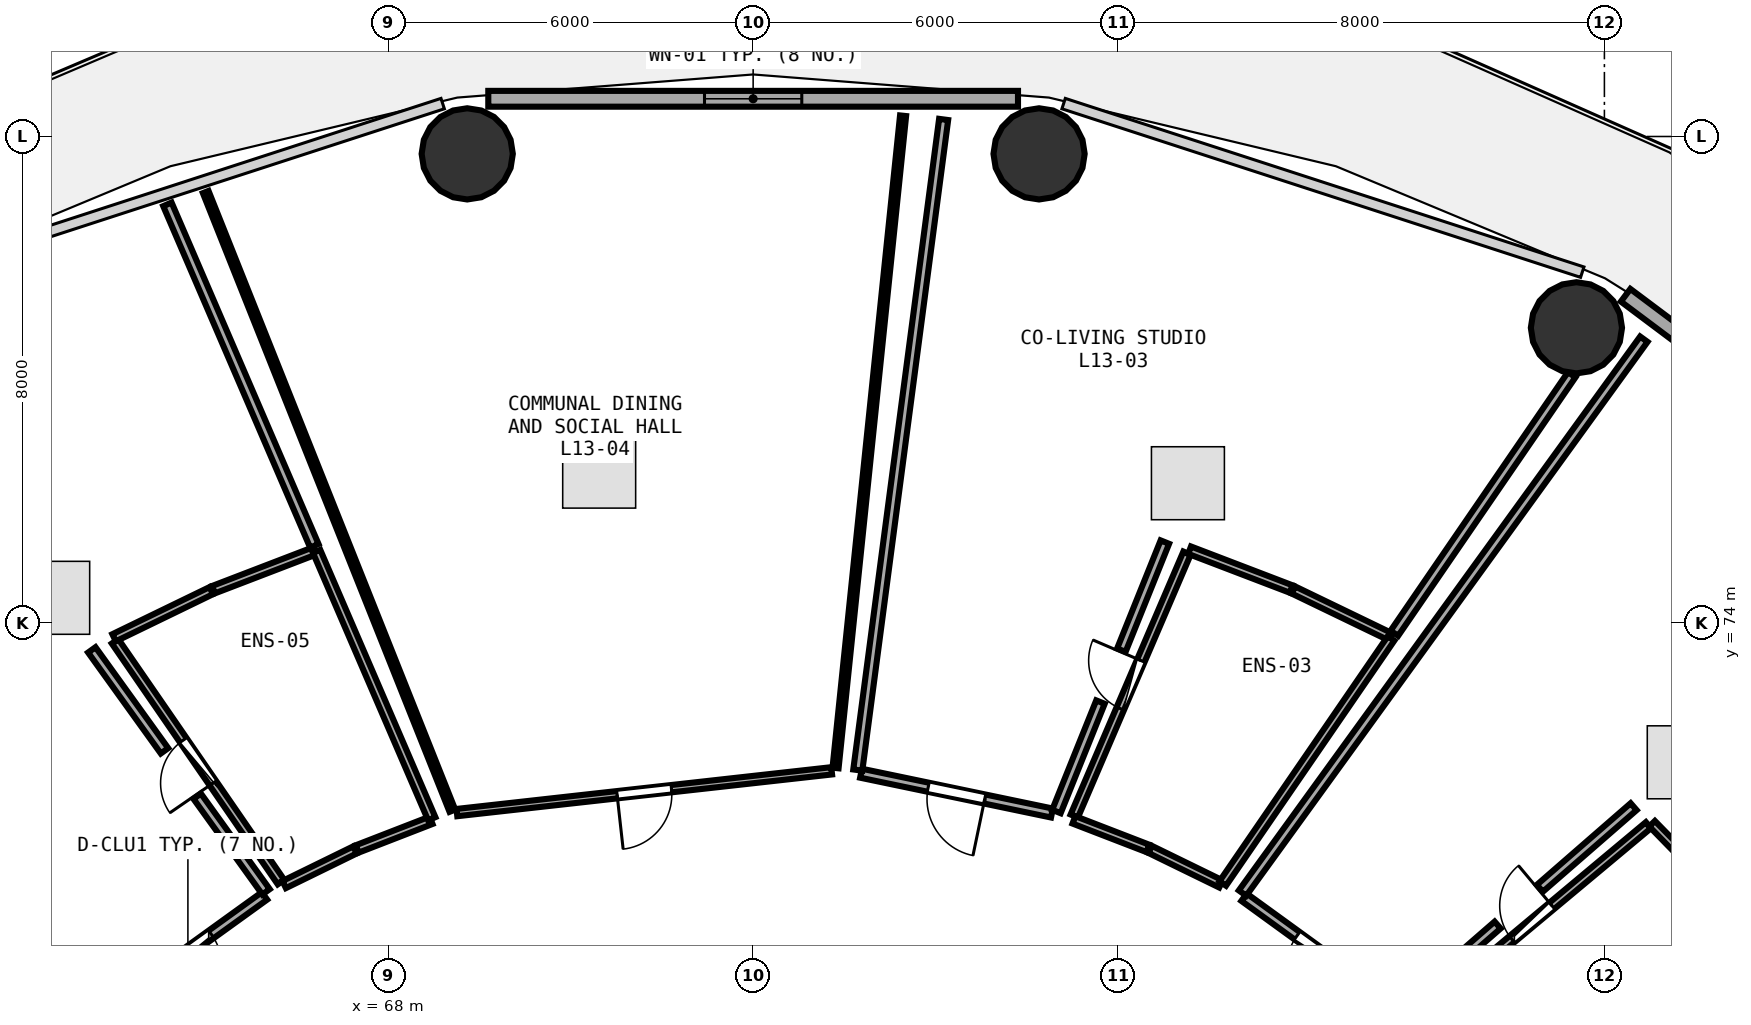
"""IFC4 building model, lengths in metres.
Left out: names, types, materials, properties, quantities, classifications, styles, units other than length and angle.
Written with IfcOpenShell. Run it as: python <this file> out.ifc"""

import sys

from ifc_helpers import new_model, si_unit, direction, frame, frame_2d, origin, origin_2d, place, context, subcontext, project, spatial, rectangle, circle, extrude, element, fill, save


model = new_model("IFC4")
c1 = context("Model", 3, precision=1e-05, world=origin(), true_north=direction((0.0, 1.0)))
c2 = subcontext(c1, "Body", "Model", "MODEL_VIEW")
j1 = project(units=[si_unit("LENGTHUNIT", "METRE"), si_unit("PLANEANGLEUNIT", "RADIAN")], contexts=[c1])
p1 = place(None, origin())
s1 = spatial("IfcSite", under=j1, at=p1, CompositionType="ELEMENT")
p2 = place(p1, origin())
s2 = spatial("IfcBuilding", under=s1, at=p2, CompositionType="ELEMENT")
p3 = place(p2, frame((0.0, 0.0, 52.5)))
s3 = spatial("IfcBuildingStorey", under=s2, at=p3, CompositionType="ELEMENT", Elevation=52.5)
for number, where, z_axis, x_axis in (
    (1, (87.54, 78.854, 0.0), (0.0, 0.0, 1.0), (1.0, 0.0, 0.0)),
    (2, (78.702, 81.714, 0.0), (0.0, 0.0, 1.0), (1.0, 0.0, 0.0)),
    (3, (69.298, 81.714, 0.0), (0.0, 0.0, 1.0), (1.0, 0.0, 0.0)),
):
    element("IfcColumn", number, at=place(p3, frame(where, z_axis=z_axis, x_axis=x_axis)), inside=s3, PredefinedType="COLUMN", context=c2, shape_type="SweptSolid", body=[
        extrude(circle(Radius=0.75, at=origin_2d()), origin(), (0.0, 0.0, 1.0), 3.75),
    ])
p4 = place(p3, frame((94.984, 74.418, 0.0), z_axis=(0.0, 0.0, 1.0), x_axis=(-0.80030733173, 0.599590005569, 0.0)))
e4 = element("IfcWall", 4, at=p4, inside=s3, PredefinedType="SOLIDWALL", context=c2, shape_type="SweptSolid", body=[
    extrude(rectangle(XDim=8.291, YDim=0.26, at=frame_2d((4.145, 0.0))), origin(), (0.0, 0.0, 1.0), 3.475),
])
p5 = place(p4, frame((3.67, 0.0, 0.0)))
e5 = element("IfcOpeningElement", 5, at=p5, cuts=e4, PredefinedType="OPENING", context=c2, shape_type="SweptSolid", body=[
    extrude(rectangle(XDim=0.95, YDim=2.1, at=frame_2d((0.475, 1.05))), frame((0.0, 0.14, 0.0), z_axis=(0.0, -1.0, 0.0), x_axis=(1.0, 0.0, 0.0)), (0.0, 0.0, 1.0), 0.28),
])
p6 = place(p4, frame((4.97, 0.0, 0.85)))
e6 = element("IfcOpeningElement", 6, at=p6, cuts=e4, PredefinedType="OPENING", context=c2, shape_type="SweptSolid", body=[
    extrude(rectangle(XDim=1.2, YDim=1.45, at=frame_2d((0.6, 0.725))), frame((0.0, 0.14, 0.0), z_axis=(0.0, -1.0, 0.0), x_axis=(1.0, 0.0, 0.0)), (0.0, 0.0, 1.0), 0.28),
])
p7 = place(p3, frame((78.356, 82.62, 0.0), z_axis=(0.0, 0.0, 1.0), x_axis=(-1.0, 0.0, 0.0)))
e7 = element("IfcWall", 7, at=p7, inside=s3, PredefinedType="SOLIDWALL", context=c2, shape_type="SweptSolid", body=[
    extrude(rectangle(XDim=8.712, YDim=0.26, at=frame_2d((4.356, 0.0))), origin(), (0.0, 0.0, 1.0), 3.475),
])
p8 = place(p7, frame((3.556, 0.0, 0.85)))
e8 = element("IfcOpeningElement", 8, at=p8, cuts=e7, PredefinedType="OPENING", context=c2, shape_type="SweptSolid", body=[
    extrude(rectangle(XDim=1.6, YDim=1.45, at=frame_2d((0.8, 0.725))), frame((0.0, 0.14, 0.0), z_axis=(0.0, -1.0, 0.0), x_axis=(1.0, 0.0, 0.0)), (0.0, 0.0, 1.0), 0.28),
])
p9 = place(p3, frame((84.892, 67.475, 0.0), z_axis=(0.0, 0.0, 1.0), x_axis=(0.767551433238, 0.64098736129, 0.0)))
e9 = element("IfcWall", 9, at=p9, inside=s3, PredefinedType="PLUMBINGWALL", context=c2, shape_type="SweptSolid", body=[
    extrude(rectangle(XDim=4.992, YDim=0.13, at=frame_2d((2.496, 0.0))), origin(), (0.0, 0.0, 1.0), 3.175),
])
p10 = place(p9, frame((2.066, 0.0, 0.0)))
e10 = element("IfcOpeningElement", 10, at=p10, cuts=e9, PredefinedType="OPENING", context=c2, shape_type="SweptSolid", body=[
    extrude(rectangle(XDim=0.86, YDim=2.05, at=frame_2d((0.43, 1.025))), frame((0.0, 0.075, 0.0), z_axis=(0.0, -1.0, 0.0), x_axis=(1.0, 0.0, 0.0)), (0.0, 0.0, 1.0), 0.15),
])
p11 = place(p3, frame((84.586, 67.667, 0.0), z_axis=(0.0, 0.0, 1.0), x_axis=(-0.80951419377, 0.587100306664, 0.0)))
e11 = element("IfcWall", 11, at=p11, inside=s3, PredefinedType="PARTITIONING", context=c2, shape_type="SweptSolid", body=[
    extrude(rectangle(XDim=3.104, YDim=0.15, at=frame_2d((1.552, 0.0))), origin(), (0.0, 0.0, 1.0), 2.875),
])
p12 = place(p11, frame((1.077, 0.0, 0.0)))
e12 = element("IfcOpeningElement", 12, at=p12, cuts=e11, PredefinedType="OPENING", context=c2, shape_type="SweptSolid", body=[
    extrude(rectangle(XDim=0.95, YDim=2.08, at=frame_2d((0.475, 1.04))), frame((0.0, 0.085, 0.0), z_axis=(0.0, -1.0, 0.0), x_axis=(1.0, 0.0, 0.0)), (0.0, 0.0, 1.0), 0.17),
])
p13 = place(p3, frame((79.281, 70.824, 0.0), z_axis=(0.0, 0.0, 1.0), x_axis=(0.394194788946, 0.919026913843, 0.0)))
e13 = element("IfcWall", 13, at=p13, inside=s3, PredefinedType="PLUMBINGWALL", context=c2, shape_type="SweptSolid", body=[
    extrude(rectangle(XDim=4.706, YDim=0.13, at=frame_2d((2.353, 0.0))), origin(), (0.0, 0.0, 1.0), 2.875),
])
p14 = place(p13, frame((1.923, 0.0, 0.0)))
e14 = element("IfcOpeningElement", 14, at=p14, cuts=e13, PredefinedType="OPENING", context=c2, shape_type="SweptSolid", body=[
    extrude(rectangle(XDim=0.86, YDim=2.05, at=frame_2d((0.43, 1.025))), frame((0.0, 0.075, 0.0), z_axis=(0.0, -1.0, 0.0), x_axis=(1.0, 0.0, 0.0)), (0.0, 0.0, 1.0), 0.15),
])
p15 = place(p3, frame((78.914, 70.874, 0.0), z_axis=(0.0, 0.0, 1.0), x_axis=(-0.978952544969, 0.204088007237, 0.0)))
e15 = element("IfcWall", 15, at=p15, inside=s3, PredefinedType="PARTITIONING", context=c2, shape_type="SweptSolid", body=[
    extrude(rectangle(XDim=3.207, YDim=0.15, at=frame_2d((1.604, 0.0))), origin(), (0.0, 0.0, 1.0), 3.235),
])
p16 = place(p15, frame((1.129, 0.0, 0.0)))
e16 = element("IfcOpeningElement", 16, at=p16, cuts=e15, PredefinedType="OPENING", context=c2, shape_type="SweptSolid", body=[
    extrude(rectangle(XDim=0.95, YDim=2.08, at=frame_2d((0.475, 1.04))), frame((0.0, 0.085, 0.0), z_axis=(0.0, -1.0, 0.0), x_axis=(1.0, 0.0, 0.0)), (0.0, 0.0, 1.0), 0.17),
])
p17 = place(p3, frame((75.292, 71.568, 0.0), z_axis=(0.0, 0.0, 1.0), x_axis=(-0.993850084324, -0.110733959964, 0.0)))
e17 = element("IfcWall", 17, at=p17, inside=s3, PredefinedType="PARTITIONING", context=c2, shape_type="SweptSolid", body=[
    extrude(rectangle(XDim=6.202, YDim=0.12, at=frame_2d((3.101, 0.0))), origin(), (0.0, 0.0, 1.0), 2.875),
])
p18 = place(p17, frame((2.651, 0.0, 0.0)))
e18 = element("IfcOpeningElement", 18, at=p18, cuts=e17, PredefinedType="OPENING", context=c2, shape_type="SweptSolid", body=[
    extrude(rectangle(XDim=0.9, YDim=2.08, at=frame_2d((0.45, 1.04))), frame((0.0, 0.07, 0.0), z_axis=(0.0, -1.0, 0.0), x_axis=(1.0, 0.0, 0.0)), (0.0, 0.0, 1.0), 0.14),
])
p19 = place(p3, frame((66.235, 69.738, 0.0), z_axis=(0.0, 0.0, 1.0), x_axis=(-0.567426867042, 0.823423797664, 0.0)))
e19 = element("IfcWall", 19, at=p19, inside=s3, PredefinedType="PLUMBINGWALL", context=c2, shape_type="SweptSolid", body=[
    extrude(rectangle(XDim=4.809, YDim=0.13, at=frame_2d((2.405, 0.0))), origin(), (0.0, 0.0, 1.0), 3.175),
])
p20 = place(p19, frame((1.975, 0.0, 0.0)))
e20 = element("IfcOpeningElement", 20, at=p20, cuts=e19, PredefinedType="OPENING", context=c2, shape_type="SweptSolid", body=[
    extrude(rectangle(XDim=0.86, YDim=2.05, at=frame_2d((0.43, 1.025))), frame((0.0, 0.075, 0.0), z_axis=(0.0, -1.0, 0.0), x_axis=(1.0, 0.0, 0.0)), (0.0, 0.0, 1.0), 0.15),
])
p21 = place(p3, frame((65.963, 69.511, 0.0), z_axis=(0.0, 0.0, 1.0), x_axis=(-0.811021116066, -0.585016879496, 0.0)))
e21 = element("IfcWall", 21, at=p21, inside=s3, PredefinedType="PARTITIONING", context=c2, shape_type="SweptSolid", body=[
    extrude(rectangle(XDim=3.106, YDim=0.15, at=frame_2d((1.553, 0.0))), origin(), (0.0, 0.0, 1.0), 2.875),
])
p22 = place(p21, frame((1.078, 0.0, 0.0)))
e22 = element("IfcOpeningElement", 22, at=p22, cuts=e21, PredefinedType="OPENING", context=c2, shape_type="SweptSolid", body=[
    extrude(rectangle(XDim=0.95, YDim=2.08, at=frame_2d((0.475, 1.04))), frame((0.0, 0.085, 0.0), z_axis=(0.0, -1.0, 0.0), x_axis=(1.0, 0.0, 0.0)), (0.0, 0.0, 1.0), 0.17),
])
p23 = place(p3, frame((86.779, 65.245, 0.0), z_axis=(0.0, 0.0, 1.0), x_axis=(0.878114235828, 0.478451030761, 0.0)))
e23 = element("IfcWall", 23, at=p23, inside=s3, PredefinedType="PARTITIONING", context=c2, shape_type="SweptSolid", body=[
    extrude(rectangle(XDim=11.942, YDim=0.15, at=frame_2d((5.971, 0.0))), origin(), (0.0, 0.0, 1.0), 2.875),
])
p24 = place(p3, frame((88.784, 70.699, 0.0), z_axis=(0.0, 0.0, 1.0), x_axis=(0.698493231478, -0.715616661055, 0.0)))
e24 = element("IfcWall", 24, at=p24, inside=s3, PredefinedType="PLUMBINGWALL", context=c2, shape_type="SweptSolid", body=[
    extrude(rectangle(XDim=1.711, YDim=0.13, at=frame_2d((0.855, 0.0))), origin(), (0.0, 0.0, 1.0), 2.875),
])
p25 = place(p3, frame((82.049, 69.557, 0.0), z_axis=(0.0, 0.0, 1.0), x_axis=(0.586718941426, 0.809790641939, 0.0)))
e25 = element("IfcWall", 25, at=p25, inside=s3, PredefinedType="PARTITIONING", context=c2, shape_type="SweptSolid", body=[
    extrude(rectangle(XDim=11.249, YDim=0.15, at=frame_2d((5.625, 0.0))), origin(), (0.0, 0.0, 1.0), 2.875),
])
p26 = place(p3, frame((88.481, 70.979, 0.0), z_axis=(0.0, 0.0, 1.0), x_axis=(-0.754356172394, -0.656465357176, 0.0)))
e26 = element("IfcWall", 26, at=p26, inside=s3, PredefinedType="PARTITIONING", context=c2, shape_type="SweptSolid", body=[
    extrude(rectangle(XDim=2.045, YDim=0.15, at=frame_2d((1.022, 0.0))), origin(), (0.0, 0.0, 1.0), 3.175),
])
p27 = place(p3, frame((86.244, 69.032, 0.0), z_axis=(0.0, 0.0, 1.0), x_axis=(-0.754351792987, -0.656470389597, 0.0)))
e27 = element("IfcWall", 27, at=p27, inside=s3, PredefinedType="PARTITIONING", context=c2, shape_type="SweptSolid", body=[
    extrude(rectangle(XDim=2.093, YDim=0.15, at=frame_2d((1.046, 0.0))), origin(), (0.0, 0.0, 1.0), 3.235),
])
p28 = place(p3, frame((81.694, 69.708, 0.0), z_axis=(0.0, 0.0, 1.0), x_axis=(-0.898753964496, 0.43845331713, 0.0)))
e28 = element("IfcWall", 28, at=p28, inside=s3, PredefinedType="PLUMBINGWALL", context=c2, shape_type="SweptSolid", body=[
    extrude(rectangle(XDim=1.296, YDim=0.13, at=frame_2d((0.648, 0.0))), origin(), (0.0, 0.0, 1.0), 2.875),
])
p29 = place(p3, frame((80.492, 70.292, 0.0), z_axis=(0.0, 0.0, 1.0), x_axis=(-0.932939679843, 0.360032712089, 0.0)))
e29 = element("IfcWall", 29, at=p29, inside=s3, PredefinedType="PLUMBINGWALL", context=c2, shape_type="SweptSolid", body=[
    extrude(rectangle(XDim=1.304, YDim=0.13, at=frame_2d((0.652, 0.0))), origin(), (0.0, 0.0, 1.0), 3.48),
])
p30 = place(p3, frame((81.178, 75.197, 0.0), z_axis=(0.0, 0.0, 1.0), x_axis=(0.934026387995, -0.357204012477, 0.0)))
e30 = element("IfcWall", 30, at=p30, inside=s3, PredefinedType="PLUMBINGWALL", context=c2, shape_type="SweptSolid", body=[
    extrude(rectangle(XDim=1.789, YDim=0.13, at=frame_2d((0.894, 0.0))), origin(), (0.0, 0.0, 1.0), 3.48),
])
p31 = place(p3, frame((82.885, 74.542, 0.0), z_axis=(0.0, 0.0, 1.0), x_axis=(0.900637023717, -0.434572147648, 0.0)))
e31 = element("IfcWall", 31, at=p31, inside=s3, PredefinedType="PLUMBINGWALL", context=c2, shape_type="SweptSolid", body=[
    extrude(rectangle(XDim=1.775, YDim=0.13, at=frame_2d((0.888, 0.0))), origin(), (0.0, 0.0, 1.0), 3.48),
])
p32 = place(p3, frame((84.491, 73.746, 0.0), z_axis=(0.0, 0.0, 1.0), x_axis=(-0.566068810651, -0.824357993597, 0.0)))
e32 = element("IfcWall", 32, at=p32, inside=s3, PredefinedType="PLUMBINGWALL", context=c2, shape_type="SweptSolid", body=[
    extrude(rectangle(XDim=4.889, YDim=0.13, at=frame_2d((2.444, 0.0))), origin(), (0.0, 0.0, 1.0), 3.175),
])
p33 = place(p3, frame((75.721, 71.581, 0.0), z_axis=(0.0, 0.0, 1.0), x_axis=(0.130800348515, 0.991408729449, 0.0)))
e33 = element("IfcWall", 33, at=p33, inside=s3, PredefinedType="PARTITIONING", context=c2, shape_type="SweptSolid", body=[
    extrude(rectangle(XDim=10.792, YDim=0.15, at=frame_2d((5.396, 0.0))), origin(), (0.0, 0.0, 1.0), 2.875),
])
p34 = place(p3, frame((87.463, 78.083, 0.0), z_axis=(0.0, 0.0, 1.0), x_axis=(-0.565642433627, -0.824650615279, 0.0)))
e34 = element("IfcWall", 34, at=p34, inside=s3, PredefinedType="PARTITIONING", context=c2, shape_type="SweptSolid", body=[
    extrude(rectangle(XDim=5.157, YDim=0.15, at=frame_2d((2.579, 0.0))), origin(), (0.0, 0.0, 1.0), 2.875),
])
p35 = place(p3, frame((80.771, 75.33, 0.0), z_axis=(0.0, 0.0, 1.0), x_axis=(-0.373257508911, -0.927727779061, 0.0)))
e35 = element("IfcWall", 35, at=p35, inside=s3, PredefinedType="PARTITIONING", context=c2, shape_type="SweptSolid", body=[
    extrude(rectangle(XDim=1.916, YDim=0.15, at=frame_2d((0.958, 0.0))), origin(), (0.0, 0.0, 1.0), 2.875),
])
p36 = place(p3, frame((79.712, 72.699, 0.0), z_axis=(0.0, 0.0, 1.0), x_axis=(-0.373407797427, -0.927667298562, 0.0)))
e36 = element("IfcWall", 36, at=p36, inside=s3, PredefinedType="PARTITIONING", context=c2, shape_type="SweptSolid", body=[
    extrude(rectangle(XDim=1.94, YDim=0.15, at=frame_2d((0.97, 0.0))), origin(), (0.0, 0.0, 1.0), 3.235),
])
p37 = place(p3, frame((69.053, 70.912, 0.0), z_axis=(0.0, 0.0, 1.0), x_axis=(-0.370325956987, 0.928901870803, 0.0)))
e37 = element("IfcWall", 37, at=p37, inside=s3, PredefinedType="PARTITIONING", context=c2, shape_type="SweptSolid", body=[
    extrude(rectangle(XDim=10.954, YDim=0.1, at=frame_2d((5.477, 0.0))), origin(), (0.0, 0.0, 1.0), 2.875),
])
p38 = place(p3, frame((76.466, 82.341, 0.0), z_axis=(0.0, 0.0, 1.0), x_axis=(-0.103008831227, -0.994680441493, 0.0)))
e38 = element("IfcWall", 38, at=p38, inside=s3, PredefinedType="PARTITIONING", context=c2, shape_type="SweptSolid", body=[
    extrude(rectangle(XDim=10.784, YDim=0.1, at=frame_2d((5.392, 0.0))), origin(), (0.0, 0.0, 1.0), 2.875),
])
p39 = place(p3, frame((68.703, 70.755, 0.0), z_axis=(0.0, 0.0, 1.0), x_axis=(-0.932299479839, -0.361687268082, 0.0)))
e39 = element("IfcWall", 39, at=p39, inside=s3, PredefinedType="PLUMBINGWALL", context=c2, shape_type="SweptSolid", body=[
    extrude(rectangle(XDim=1.304, YDim=0.13, at=frame_2d((0.652, 0.0))), origin(), (0.0, 0.0, 1.0), 3.48),
])
p40 = place(p3, frame((67.451, 70.267, 0.0), z_axis=(0.0, 0.0, 1.0), x_axis=(-0.898275282077, -0.439433177639, 0.0)))
e40 = element("IfcWall", 40, at=p40, inside=s3, PredefinedType="PLUMBINGWALL", context=c2, shape_type="SweptSolid", body=[
    extrude(rectangle(XDim=1.296, YDim=0.13, at=frame_2d((0.648, 0.0))), origin(), (0.0, 0.0, 1.0), 3.48),
])
p41 = place(p3, frame((63.49, 73.757, 0.0), z_axis=(0.0, 0.0, 1.0), x_axis=(0.899832096889, 0.436236400829, 0.0)))
e41 = element("IfcWall", 41, at=p41, inside=s3, PredefinedType="PLUMBINGWALL", context=c2, shape_type="SweptSolid", body=[
    extrude(rectangle(XDim=1.776, YDim=0.13, at=frame_2d((0.888, 0.0))), origin(), (0.0, 0.0, 1.0), 3.48),
])
p42 = place(p3, frame((65.125, 74.547, 0.0), z_axis=(0.0, 0.0, 1.0), x_axis=(0.93361980904, 0.35826533766, 0.0)))
e42 = element("IfcWall", 42, at=p42, inside=s3, PredefinedType="PLUMBINGWALL", context=c2, shape_type="SweptSolid", body=[
    extrude(rectangle(XDim=1.788, YDim=0.13, at=frame_2d((0.894, 0.0))), origin(), (0.0, 0.0, 1.0), 3.48),
])
p43 = place(p3, frame((66.821, 75.177, 0.0), z_axis=(0.0, 0.0, 1.0), x_axis=(0.395562338017, -0.918439130668, 0.0)))
e43 = element("IfcWall", 43, at=p43, inside=s3, PredefinedType="PLUMBINGWALL", context=c2, shape_type="SweptSolid", body=[
    extrude(rectangle(XDim=4.786, YDim=0.13, at=frame_2d((2.393, 0.0))), origin(), (0.0, 0.0, 1.0), 3.175),
])
p44 = place(p3, frame((63.366, 67.685, 0.0), z_axis=(0.0, 0.0, 1.0), x_axis=(-0.752403187404, 0.658702849231, 0.0)))
e44 = element("IfcWall", 44, at=p44, inside=s3, PredefinedType="PARTITIONING", context=c2, shape_type="SweptSolid", body=[
    extrude(rectangle(XDim=11.595, YDim=0.15, at=frame_2d((5.797, 0.0))), origin(), (0.0, 0.0, 1.0), 2.875),
])
p45 = place(p3, frame((64.367, 80.884, 0.0), z_axis=(0.0, 0.0, 1.0), x_axis=(0.395282873179, -0.918559442917, 0.0)))
e45 = element("IfcWall", 45, at=p45, inside=s3, PredefinedType="PARTITIONING", context=c2, shape_type="SweptSolid", body=[
    extrude(rectangle(XDim=6.113, YDim=0.15, at=frame_2d((3.057, 0.0))), origin(), (0.0, 0.0, 1.0), 2.875),
])
p46 = place(p3, frame((63.123, 73.558, 0.0), z_axis=(0.0, 0.0, 1.0), x_axis=(0.58432672942, -0.811518498425, 0.0)))
e46 = element("IfcWall", 46, at=p46, inside=s3, PredefinedType="PARTITIONING", context=c2, shape_type="SweptSolid", body=[
    extrude(rectangle(XDim=2.046, YDim=0.15, at=frame_2d((1.023, 0.0))), origin(), (0.0, 0.0, 1.0), 3.175),
])
p47 = place(p3, frame((64.857, 71.151, 0.0), z_axis=(0.0, 0.0, 1.0), x_axis=(0.584298085417, -0.811539122519, 0.0)))
e47 = element("IfcWall", 47, at=p47, inside=s3, PredefinedType="PARTITIONING", context=c2, shape_type="SweptSolid", body=[
    extrude(rectangle(XDim=1.937, YDim=0.15, at=frame_2d((0.969, 0.0))), origin(), (0.0, 0.0, 1.0), 3.235),
])
p48 = place(p3, frame((59.224, 70.681, 0.0), z_axis=(0.0, 0.0, 1.0), x_axis=(0.768509127281, -0.63983882446, 0.0)))
e48 = element("IfcWall", 48, at=p48, inside=s3, PredefinedType="PLUMBINGWALL", context=c2, shape_type="SweptSolid", body=[
    extrude(rectangle(XDim=5.074, YDim=0.13, at=frame_2d((2.537, 0.0))), origin(), (0.0, 0.0, 1.0), 3.175),
])
p49 = place(p8, origin())
e49 = element("IfcWindow", 49, at=p49, inside=s3, PartitioningType="SINGLE_PANEL", PredefinedType="WINDOW", context=c2, shape_type="SweptSolid", body=[
    extrude(rectangle(XDim=1.6, YDim=1.45, at=frame_2d((0.8, 0.725))), frame((0.0, 0.03, 0.0), z_axis=(0.0, -1.0, 0.0), x_axis=(1.0, 0.0, 0.0)), (0.0, 0.0, 1.0), 0.06),
])
fill(e8, e49)
p50 = place(p10, origin())
e50 = element("IfcDoor", 50, at=p50, inside=s3, OperationType="SINGLE_SWING_RIGHT", PredefinedType="DOOR", context=c2, shape_type="SweptSolid", body=[
    extrude(rectangle(XDim=0.86, YDim=2.05, at=frame_2d((0.43, 1.025))), frame((0.0, 0.025, 0.0), z_axis=(0.0, -1.0, 0.0), x_axis=(1.0, 0.0, 0.0)), (0.0, 0.0, 1.0), 0.05),
])
fill(e10, e50)
p51 = place(p12, origin())
e51 = element("IfcDoor", 51, at=p51, inside=s3, OperationType="SINGLE_SWING_LEFT", PredefinedType="DOOR", context=c2, shape_type="SweptSolid", body=[
    extrude(rectangle(XDim=0.95, YDim=2.08, at=frame_2d((0.475, 1.04))), frame((0.0, 0.025, 0.0), z_axis=(0.0, -1.0, 0.0), x_axis=(1.0, 0.0, 0.0)), (0.0, 0.0, 1.0), 0.05),
])
fill(e12, e51)
p52 = place(p14, origin())
e52 = element("IfcDoor", 52, at=p52, inside=s3, OperationType="SINGLE_SWING_RIGHT", PredefinedType="DOOR", context=c2, shape_type="SweptSolid", body=[
    extrude(rectangle(XDim=0.86, YDim=2.05, at=frame_2d((0.43, 1.025))), frame((0.0, 0.025, 0.0), z_axis=(0.0, -1.0, 0.0), x_axis=(1.0, 0.0, 0.0)), (0.0, 0.0, 1.0), 0.05),
])
fill(e14, e52)
p53 = place(p16, origin())
e53 = element("IfcDoor", 53, at=p53, inside=s3, OperationType="SINGLE_SWING_LEFT", PredefinedType="DOOR", context=c2, shape_type="SweptSolid", body=[
    extrude(rectangle(XDim=0.95, YDim=2.08, at=frame_2d((0.475, 1.04))), frame((0.0, 0.025, 0.0), z_axis=(0.0, -1.0, 0.0), x_axis=(1.0, 0.0, 0.0)), (0.0, 0.0, 1.0), 0.05),
])
fill(e16, e53)
p54 = place(p18, origin())
e54 = element("IfcDoor", 54, at=p54, inside=s3, OperationType="SINGLE_SWING_RIGHT", PredefinedType="DOOR", context=c2, shape_type="SweptSolid", body=[
    extrude(rectangle(XDim=0.9, YDim=2.08, at=frame_2d((0.45, 1.04))), frame((0.0, 0.025, 0.0), z_axis=(0.0, -1.0, 0.0), x_axis=(1.0, 0.0, 0.0)), (0.0, 0.0, 1.0), 0.05),
])
fill(e18, e54)
p55 = place(p20, origin())
e55 = element("IfcDoor", 55, at=p55, inside=s3, OperationType="SINGLE_SWING_LEFT", PredefinedType="DOOR", context=c2, shape_type="SweptSolid", body=[
    extrude(rectangle(XDim=0.86, YDim=2.05, at=frame_2d((0.43, 1.025))), frame((0.0, 0.025, 0.0), z_axis=(0.0, -1.0, 0.0), x_axis=(1.0, 0.0, 0.0)), (0.0, 0.0, 1.0), 0.05),
])
fill(e20, e55)
p56 = place(p22, origin())
e56 = element("IfcDoor", 56, at=p56, inside=s3, OperationType="SINGLE_SWING_RIGHT", PredefinedType="DOOR", context=c2, shape_type="SweptSolid", body=[
    extrude(rectangle(XDim=0.95, YDim=2.08, at=frame_2d((0.475, 1.04))), frame((0.0, 0.025, 0.0), z_axis=(0.0, -1.0, 0.0), x_axis=(1.0, 0.0, 0.0)), (0.0, 0.0, 1.0), 0.05),
])
fill(e22, e56)
save(model, sys.argv[1])
